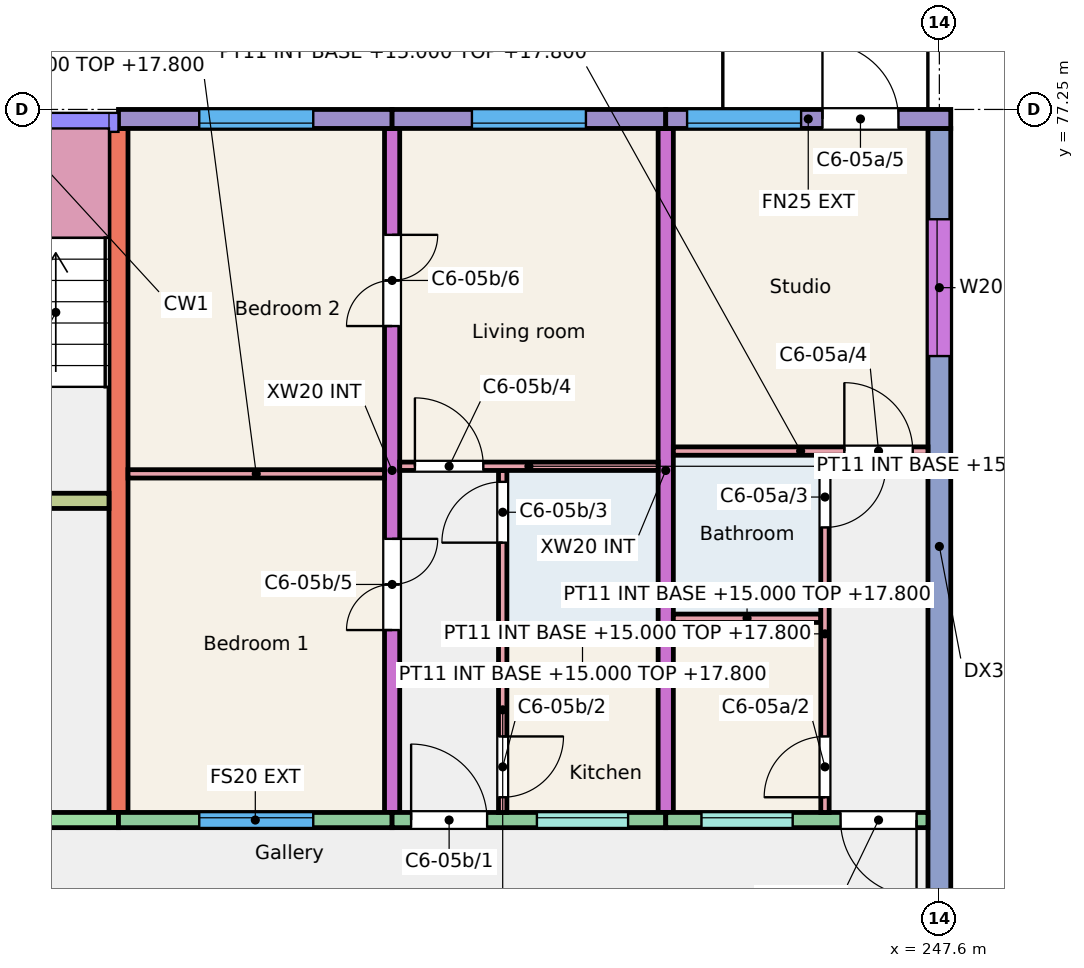
"""IFC4 building model, lengths in metres.
Left out: names, types, materials, properties, quantities, classifications, styles, units other than length and angle.
Written with IfcOpenShell. Run it as: python <this file> out.ifc"""

import sys

from ifc_helpers import new_model, si_unit, direction, frame, frame_2d, origin, place, context, subcontext, project, spatial, rectangle, extrude, element, fill, save


model = new_model("IFC4")
c1 = context("Model", 3, precision=1e-05, world=origin(), true_north=direction((0.0, 1.0)))
c2 = subcontext(c1, "Body", "Model", "MODEL_VIEW")
j1 = project(units=[si_unit("LENGTHUNIT", "METRE"), si_unit("PLANEANGLEUNIT", "RADIAN")], contexts=[c1])
p1 = place(None, origin())
s1 = spatial("IfcSite", under=j1, at=p1, CompositionType="ELEMENT")
p2 = place(p1, origin())
s2 = spatial("IfcBuilding", under=s1, at=p2, CompositionType="ELEMENT")
p3 = place(p2, frame((0.0, 0.0, 15.0)))
s3 = spatial("IfcBuildingStorey", under=s2, at=p3, CompositionType="ELEMENT", Elevation=15.0)
p4 = place(p3, frame((236.8, 68.0, 0.0), z_axis=(0.0, 0.0, 1.0), x_axis=(0.0, 1.0, 0.0)))
e1 = element("IfcWall", 1, at=p4, inside=s3, PredefinedType="SHEAR", context=c2, shape_type="SweptSolid", body=[
    extrude(rectangle(XDim=9.0, YDim=0.25, at=frame_2d((4.5, 0.0))), origin(), (0.0, 0.0, 1.0), 3.0),
])
p5 = place(p3, frame((240.4, 68.0, 0.0), z_axis=(0.0, 0.0, 1.0), x_axis=(0.0, 1.0, 0.0)))
e2 = element("IfcWall", 2, at=p5, inside=s3, PredefinedType="SHEAR", context=c2, shape_type="SweptSolid", body=[
    extrude(rectangle(XDim=9.0, YDim=0.2, at=frame_2d((4.5, 0.0))), origin(), (0.0, 0.0, 1.0), 3.0),
])
p6 = place(p5, frame((2.4, 0.0, 0.0)))
e3 = element("IfcOpeningElement", 3, at=p6, cuts=e2, PredefinedType="OPENING", context=c2, shape_type="SweptSolid", body=[
    extrude(rectangle(XDim=1.2, YDim=2.1, at=frame_2d((0.6, 1.05))), frame((0.0, 0.11, 0.0), z_axis=(0.0, -1.0, 0.0), x_axis=(1.0, 0.0, 0.0)), (0.0, 0.0, 1.0), 0.22),
])
p7 = place(p5, frame((6.4, 0.0, 0.0)))
e4 = element("IfcOpeningElement", 4, at=p7, cuts=e2, PredefinedType="OPENING", context=c2, shape_type="SweptSolid", body=[
    extrude(rectangle(XDim=1.2, YDim=2.1, at=frame_2d((0.6, 1.05))), frame((0.0, 0.11, 0.0), z_axis=(0.0, -1.0, 0.0), x_axis=(1.0, 0.0, 0.0)), (0.0, 0.0, 1.0), 0.22),
])
p8 = place(p3, frame((244.0, 68.0, 0.0), z_axis=(0.0, 0.0, 1.0), x_axis=(0.0, 1.0, 0.0)))
e5 = element("IfcWall", 5, at=p8, inside=s3, PredefinedType="SHEAR", context=c2, shape_type="SweptSolid", body=[
    extrude(rectangle(XDim=9.0, YDim=0.2, at=frame_2d((4.5, 0.0))), origin(), (0.0, 0.0, 1.0), 3.0),
])
p9 = place(p3, frame((247.6, 66.0, 0.0), z_axis=(0.0, 0.0, 1.0), x_axis=(0.0, 1.0, 0.0)))
e6 = element("IfcWall", 6, at=p9, inside=s3, PredefinedType="SHEAR", context=c2, shape_type="SweptSolid", body=[
    extrude(rectangle(XDim=11.0, YDim=0.3, at=frame_2d((5.5, 0.0))), origin(), (0.0, 0.0, 1.0), 3.0),
])
p10 = place(p9, frame((8.005, 0.0, 0.9)))
e7 = element("IfcOpeningElement", 7, at=p10, cuts=e6, PredefinedType="OPENING", context=c2, shape_type="SweptSolid", body=[
    extrude(rectangle(XDim=1.8, YDim=1.5, at=frame_2d((0.9, 0.75))), frame((0.0, 0.16, 0.0), z_axis=(0.0, -1.0, 0.0), x_axis=(1.0, 0.0, 0.0)), (0.0, 0.0, 1.0), 0.32),
])
p11 = place(p3, frame((230.95, 67.9, 0.0), z_axis=(0.0, 0.0, 1.0), x_axis=(1.0, 0.0, 0.0)))
e8 = element("IfcWall", 8, at=p11, inside=s3, PredefinedType="SHEAR", context=c2, shape_type="SweptSolid", body=[
    extrude(rectangle(XDim=5.85, YDim=0.2, at=frame_2d((2.925, 0.0))), origin(), (0.0, 0.0, 1.0), 3.0),
])
p12 = place(p11, frame((2.312, 0.0, 0.0)))
e9 = element("IfcOpeningElement", 9, at=p12, cuts=e8, PredefinedType="OPENING", context=c2, shape_type="SweptSolid", body=[
    extrude(rectangle(XDim=1.1, YDim=2.1, at=frame_2d((0.55, 1.05))), frame((0.0, 0.11, 0.0), z_axis=(0.0, -1.0, 0.0), x_axis=(1.0, 0.0, 0.0)), (0.0, 0.0, 1.0), 0.22),
])
p13 = place(p3, frame((230.95, 72.1, 0.0), z_axis=(0.0, 0.0, 1.0), x_axis=(1.0, 0.0, 0.0)))
e10 = element("IfcWall", 10, at=p13, inside=s3, PredefinedType="SHEAR", context=c2, shape_type="SweptSolid", body=[
    extrude(rectangle(XDim=5.725, YDim=0.2, at=frame_2d((2.863, 0.0))), origin(), (0.0, 0.0, 1.0), 3.0),
])
p14 = place(p13, frame((3.775, 0.0, 0.0)))
e11 = element("IfcOpeningElement", 11, at=p14, cuts=e10, PredefinedType="OPENING", context=c2, shape_type="SweptSolid", body=[
    extrude(rectangle(XDim=1.0, YDim=2.1, at=frame_2d((0.5, 1.05))), frame((0.0, 0.11, 0.0), z_axis=(0.0, -1.0, 0.0), x_axis=(1.0, 0.0, 0.0)), (0.0, 0.0, 1.0), 0.22),
])
p15 = place(p13, frame((0.762, 0.0, 0.0)))
e12 = element("IfcOpeningElement", 12, at=p15, cuts=e10, PredefinedType="OPENING", context=c2, shape_type="SweptSolid", body=[
    extrude(rectangle(XDim=1.1, YDim=2.1, at=frame_2d((0.55, 1.05))), frame((0.0, 0.11, 0.0), z_axis=(0.0, -1.0, 0.0), x_axis=(1.0, 0.0, 0.0)), (0.0, 0.0, 1.0), 0.22),
])
p16 = place(p3, frame((236.8, 77.125, 0.0), z_axis=(0.0, 0.0, 1.0), x_axis=(1.0, 0.0, 0.0)))
e13 = element("IfcWall", 13, at=p16, inside=s3, PredefinedType="SOLIDWALL", context=c2, shape_type="SweptSolid", body=[
    extrude(rectangle(XDim=3.6, YDim=0.25, at=frame_2d((1.8, 0.0))), origin(), (0.0, 0.0, 1.0), 3.0),
])
p17 = place(p16, frame((1.062, 0.0, 0.9)))
e14 = element("IfcOpeningElement", 14, at=p17, cuts=e13, PredefinedType="OPENING", context=c2, shape_type="SweptSolid", body=[
    extrude(rectangle(XDim=1.5, YDim=1.5, at=frame_2d((0.75, 0.75))), frame((0.0, 0.135, 0.0), z_axis=(0.0, -1.0, 0.0), x_axis=(1.0, 0.0, 0.0)), (0.0, 0.0, 1.0), 0.27),
])
p18 = place(p3, frame((236.8, 67.9, 0.0), z_axis=(0.0, 0.0, 1.0), x_axis=(1.0, 0.0, 0.0)))
e15 = element("IfcWall", 15, at=p18, inside=s3, PredefinedType="SOLIDWALL", context=c2, shape_type="SweptSolid", body=[
    extrude(rectangle(XDim=3.6, YDim=0.2, at=frame_2d((1.8, 0.0))), origin(), (0.0, 0.0, 1.0), 3.0),
])
p19 = place(p18, frame((1.062, 0.0, 0.9)))
e16 = element("IfcOpeningElement", 16, at=p19, cuts=e15, PredefinedType="OPENING", context=c2, shape_type="SweptSolid", body=[
    extrude(rectangle(XDim=1.5, YDim=1.5, at=frame_2d((0.75, 0.75))), frame((0.0, 0.11, 0.0), z_axis=(0.0, -1.0, 0.0), x_axis=(1.0, 0.0, 0.0)), (0.0, 0.0, 1.0), 0.22),
])
p20 = place(p3, frame((240.4, 77.125, 0.0), z_axis=(0.0, 0.0, 1.0), x_axis=(1.0, 0.0, 0.0)))
e17 = element("IfcWall", 17, at=p20, inside=s3, PredefinedType="SOLIDWALL", context=c2, shape_type="SweptSolid", body=[
    extrude(rectangle(XDim=3.6, YDim=0.25, at=frame_2d((1.8, 0.0))), origin(), (0.0, 0.0, 1.0), 3.0),
])
p21 = place(p20, frame((1.05, 0.0, 0.9)))
e18 = element("IfcOpeningElement", 18, at=p21, cuts=e17, PredefinedType="OPENING", context=c2, shape_type="SweptSolid", body=[
    extrude(rectangle(XDim=1.5, YDim=1.5, at=frame_2d((0.75, 0.75))), frame((0.0, 0.135, 0.0), z_axis=(0.0, -1.0, 0.0), x_axis=(1.0, 0.0, 0.0)), (0.0, 0.0, 1.0), 0.27),
])
p22 = place(p3, frame((240.4, 67.9, 0.0), z_axis=(0.0, 0.0, 1.0), x_axis=(1.0, 0.0, 0.0)))
e19 = element("IfcWall", 19, at=p22, inside=s3, PredefinedType="SOLIDWALL", context=c2, shape_type="SweptSolid", body=[
    extrude(rectangle(XDim=3.6, YDim=0.2, at=frame_2d((1.8, 0.0))), origin(), (0.0, 0.0, 1.0), 3.0),
])
p23 = place(p22, frame((1.905, 0.0, 1.1)))
e20 = element("IfcOpeningElement", 20, at=p23, cuts=e19, PredefinedType="OPENING", context=c2, shape_type="SweptSolid", body=[
    extrude(rectangle(XDim=1.2, YDim=1.3, at=frame_2d((0.6, 0.65))), frame((0.0, 0.11, 0.0), z_axis=(0.0, -1.0, 0.0), x_axis=(1.0, 0.0, 0.0)), (0.0, 0.0, 1.0), 0.22),
])
p24 = place(p22, frame((0.25, 0.0, 0.0)))
e21 = element("IfcOpeningElement", 21, at=p24, cuts=e19, PredefinedType="OPENING", context=c2, shape_type="SweptSolid", body=[
    extrude(rectangle(XDim=1.0, YDim=2.1, at=frame_2d((0.5, 1.05))), frame((0.0, 0.11, 0.0), z_axis=(0.0, -1.0, 0.0), x_axis=(1.0, 0.0, 0.0)), (0.0, 0.0, 1.0), 0.22),
])
p25 = place(p3, frame((244.0, 77.125, 0.0), z_axis=(0.0, 0.0, 1.0), x_axis=(1.0, 0.0, 0.0)))
e22 = element("IfcWall", 22, at=p25, inside=s3, PredefinedType="SOLIDWALL", context=c2, shape_type="SweptSolid", body=[
    extrude(rectangle(XDim=3.75, YDim=0.25, at=frame_2d((1.875, 0.0))), origin(), (0.0, 0.0, 1.0), 3.0),
])
p26 = place(p25, frame((0.281, 0.0, 0.9)))
e23 = element("IfcOpeningElement", 23, at=p26, cuts=e22, PredefinedType="OPENING", context=c2, shape_type="SweptSolid", body=[
    extrude(rectangle(XDim=1.5, YDim=1.5, at=frame_2d((0.75, 0.75))), frame((0.0, 0.135, 0.0), z_axis=(0.0, -1.0, 0.0), x_axis=(1.0, 0.0, 0.0)), (0.0, 0.0, 1.0), 0.27),
])
p27 = place(p25, frame((2.062, 0.0, 0.0)))
e24 = element("IfcOpeningElement", 24, at=p27, cuts=e22, PredefinedType="OPENING", context=c2, shape_type="SweptSolid", body=[
    extrude(rectangle(XDim=1.0, YDim=2.1, at=frame_2d((0.5, 1.05))), frame((0.0, 0.135, 0.0), z_axis=(0.0, -1.0, 0.0), x_axis=(1.0, 0.0, 0.0)), (0.0, 0.0, 1.0), 0.27),
])
p28 = place(p3, frame((244.0, 67.9, 0.0), z_axis=(0.0, 0.0, 1.0), x_axis=(1.0, 0.0, 0.0)))
e25 = element("IfcWall", 25, at=p28, inside=s3, PredefinedType="SOLIDWALL", context=c2, shape_type="SweptSolid", body=[
    extrude(rectangle(XDim=3.45, YDim=0.2, at=frame_2d((1.725, 0.0))), origin(), (0.0, 0.0, 1.0), 3.0),
])
p29 = place(p28, frame((0.47, 0.0, 1.1)))
e26 = element("IfcOpeningElement", 26, at=p29, cuts=e25, PredefinedType="OPENING", context=c2, shape_type="SweptSolid", body=[
    extrude(rectangle(XDim=1.2, YDim=1.3, at=frame_2d((0.6, 0.65))), frame((0.0, 0.11, 0.0), z_axis=(0.0, -1.0, 0.0), x_axis=(1.0, 0.0, 0.0)), (0.0, 0.0, 1.0), 0.22),
])
p30 = place(p28, frame((2.3, 0.0, 0.0)))
e27 = element("IfcOpeningElement", 27, at=p30, cuts=e25, PredefinedType="OPENING", context=c2, shape_type="SweptSolid", body=[
    extrude(rectangle(XDim=1.0, YDim=2.1, at=frame_2d((0.5, 1.05))), frame((0.0, 0.11, 0.0), z_axis=(0.0, -1.0, 0.0), x_axis=(1.0, 0.0, 0.0)), (0.0, 0.0, 1.0), 0.22),
])
p31 = place(p3, frame((244.1, 70.555, 0.0), z_axis=(0.0, 0.0, 1.0), x_axis=(1.0, 0.0, 0.0)))
e28 = element("IfcWall", 28, at=p31, inside=s3, PredefinedType="PARTITIONING", context=c2, shape_type="SweptSolid", body=[
    extrude(rectangle(XDim=1.94, YDim=0.11, at=frame_2d((0.97, 0.0))), origin(), (0.0, 0.0, 1.0), 2.8),
])
p32 = place(p3, frame((246.095, 68.0, 0.0), z_axis=(0.0, 0.0, 1.0), x_axis=(0.0, 1.0, 0.0)))
e29 = element("IfcWall", 29, at=p32, inside=s3, PredefinedType="PARTITIONING", context=c2, shape_type="SweptSolid", body=[
    extrude(rectangle(XDim=4.7, YDim=0.11, at=frame_2d((2.35, 0.0))), origin(), (0.0, 0.0, 1.0), 2.8),
])
p33 = place(p32, frame((0.2, 0.0, 0.0)))
e30 = element("IfcOpeningElement", 30, at=p33, cuts=e29, PredefinedType="OPENING", context=c2, shape_type="SweptSolid", body=[
    extrude(rectangle(XDim=0.8, YDim=2.1, at=frame_2d((0.4, 1.05))), frame((0.0, 0.065, 0.0), z_axis=(0.0, -1.0, 0.0), x_axis=(1.0, 0.0, 0.0)), (0.0, 0.0, 1.0), 0.13),
])
p34 = place(p32, frame((3.75, 0.0, 0.0)))
e31 = element("IfcOpeningElement", 31, at=p34, cuts=e29, PredefinedType="OPENING", context=c2, shape_type="SweptSolid", body=[
    extrude(rectangle(XDim=0.8, YDim=2.1, at=frame_2d((0.4, 1.05))), frame((0.0, 0.065, 0.0), z_axis=(0.0, -1.0, 0.0), x_axis=(1.0, 0.0, 0.0)), (0.0, 0.0, 1.0), 0.13),
])
p35 = place(p3, frame((244.1, 72.755, 0.0), z_axis=(0.0, 0.0, 1.0), x_axis=(1.0, 0.0, 0.0)))
e32 = element("IfcWall", 32, at=p35, inside=s3, PredefinedType="PARTITIONING", context=c2, shape_type="SweptSolid", body=[
    extrude(rectangle(XDim=3.35, YDim=0.11, at=frame_2d((1.675, 0.0))), origin(), (0.0, 0.0, 1.0), 2.8),
])
p36 = place(p35, frame((2.25, 0.0, 0.0)))
e33 = element("IfcOpeningElement", 33, at=p36, cuts=e32, PredefinedType="OPENING", context=c2, shape_type="SweptSolid", body=[
    extrude(rectangle(XDim=0.9, YDim=2.1, at=frame_2d((0.45, 1.05))), frame((0.0, 0.065, 0.0), z_axis=(0.0, -1.0, 0.0), x_axis=(1.0, 0.0, 0.0)), (0.0, 0.0, 1.0), 0.13),
])
p37 = place(p3, frame((241.855, 68.0, 0.0), z_axis=(0.0, 0.0, 1.0), x_axis=(0.0, 1.0, 0.0)))
e34 = element("IfcWall", 34, at=p37, inside=s3, PredefinedType="PARTITIONING", context=c2, shape_type="SweptSolid", body=[
    extrude(rectangle(XDim=4.5, YDim=0.11, at=frame_2d((2.25, 0.0))), origin(), (0.0, 0.0, 1.0), 2.8),
])
p38 = place(p37, frame((0.2, 0.0, 0.0)))
e35 = element("IfcOpeningElement", 35, at=p38, cuts=e34, PredefinedType="OPENING", context=c2, shape_type="SweptSolid", body=[
    extrude(rectangle(XDim=0.8, YDim=2.1, at=frame_2d((0.4, 1.05))), frame((0.0, 0.065, 0.0), z_axis=(0.0, -1.0, 0.0), x_axis=(1.0, 0.0, 0.0)), (0.0, 0.0, 1.0), 0.13),
])
p39 = place(p37, frame((3.55, 0.0, 0.0)))
e36 = element("IfcOpeningElement", 36, at=p39, cuts=e34, PredefinedType="OPENING", context=c2, shape_type="SweptSolid", body=[
    extrude(rectangle(XDim=0.8, YDim=2.1, at=frame_2d((0.4, 1.05))), frame((0.0, 0.065, 0.0), z_axis=(0.0, -1.0, 0.0), x_axis=(1.0, 0.0, 0.0)), (0.0, 0.0, 1.0), 0.13),
])
p40 = place(p3, frame((241.91, 70.355, 0.0), z_axis=(0.0, 0.0, 1.0), x_axis=(1.0, 0.0, 0.0)))
e37 = element("IfcWall", 37, at=p40, inside=s3, PredefinedType="PARTITIONING", context=c2, shape_type="SweptSolid", body=[
    extrude(rectangle(XDim=1.99, YDim=0.11, at=frame_2d((0.995, 0.0))), origin(), (0.0, 0.0, 1.0), 2.8),
])
p41 = place(p3, frame((240.5, 72.555, 0.0), z_axis=(0.0, 0.0, 1.0), x_axis=(1.0, 0.0, 0.0)))
e38 = element("IfcWall", 38, at=p41, inside=s3, PredefinedType="PARTITIONING", context=c2, shape_type="SweptSolid", body=[
    extrude(rectangle(XDim=3.4, YDim=0.11, at=frame_2d((1.7, 0.0))), origin(), (0.0, 0.0, 1.0), 2.8),
])
p42 = place(p41, frame((0.2, 0.0, 0.0)))
e39 = element("IfcOpeningElement", 39, at=p42, cuts=e38, PredefinedType="OPENING", context=c2, shape_type="SweptSolid", body=[
    extrude(rectangle(XDim=0.9, YDim=2.1, at=frame_2d((0.45, 1.05))), frame((0.0, 0.065, 0.0), z_axis=(0.0, -1.0, 0.0), x_axis=(1.0, 0.0, 0.0)), (0.0, 0.0, 1.0), 0.13),
])
p43 = place(p3, frame((236.925, 72.455, 0.0), z_axis=(0.0, 0.0, 1.0), x_axis=(1.0, 0.0, 0.0)))
e40 = element("IfcWall", 40, at=p43, inside=s3, PredefinedType="PARTITIONING", context=c2, shape_type="SweptSolid", body=[
    extrude(rectangle(XDim=3.375, YDim=0.11, at=frame_2d((1.688, 0.0))), origin(), (0.0, 0.0, 1.0), 2.8),
])
p44 = place(p29, origin())
e41 = element("IfcWindow", 41, at=p44, inside=s3, PartitioningType="SINGLE_PANEL", PredefinedType="WINDOW", context=c2, shape_type="SweptSolid", body=[
    extrude(rectangle(XDim=1.2, YDim=1.3, at=frame_2d((0.6, 0.65))), frame((0.0, 0.06, 0.0), z_axis=(0.0, -1.0, 0.0), x_axis=(1.0, 0.0, 0.0)), (0.0, 0.0, 1.0), 0.06),
])
fill(e26, e41)
p45 = place(p26, origin())
e42 = element("IfcWindow", 42, at=p45, inside=s3, PartitioningType="SINGLE_PANEL", PredefinedType="WINDOW", context=c2, shape_type="SweptSolid", body=[
    extrude(rectangle(XDim=1.5, YDim=1.5, at=frame_2d((0.75, 0.75))), frame((0.0, -0.025, 0.0), z_axis=(0.0, -1.0, 0.0), x_axis=(1.0, 0.0, 0.0)), (0.0, 0.0, 1.0), 0.06),
])
fill(e23, e42)
p46 = place(p10, origin())
e43 = element("IfcWindow", 43, at=p46, inside=s3, PartitioningType="SINGLE_PANEL", PredefinedType="WINDOW", context=c2, shape_type="SweptSolid", body=[
    extrude(rectangle(XDim=1.8, YDim=1.5, at=frame_2d((0.9, 0.75))), frame((0.0, 0.06, 0.0), z_axis=(0.0, -1.0, 0.0), x_axis=(1.0, 0.0, 0.0)), (0.0, 0.0, 1.0), 0.06),
])
fill(e7, e43)
p47 = place(p19, origin())
e44 = element("IfcWindow", 44, at=p47, inside=s3, PartitioningType="SINGLE_PANEL", PredefinedType="WINDOW", context=c2, shape_type="SweptSolid", body=[
    extrude(rectangle(XDim=1.5, YDim=1.5, at=frame_2d((0.75, 0.75))), frame((0.0, 0.06, 0.0), z_axis=(0.0, -1.0, 0.0), x_axis=(1.0, 0.0, 0.0)), (0.0, 0.0, 1.0), 0.06),
])
fill(e16, e44)
p48 = place(p17, origin())
e45 = element("IfcWindow", 45, at=p48, inside=s3, PartitioningType="SINGLE_PANEL", PredefinedType="WINDOW", context=c2, shape_type="SweptSolid", body=[
    extrude(rectangle(XDim=1.5, YDim=1.5, at=frame_2d((0.75, 0.75))), frame((0.0, -0.025, 0.0), z_axis=(0.0, -1.0, 0.0), x_axis=(1.0, 0.0, 0.0)), (0.0, 0.0, 1.0), 0.06),
])
fill(e14, e45)
p49 = place(p23, origin())
e46 = element("IfcWindow", 46, at=p49, inside=s3, PartitioningType="SINGLE_PANEL", PredefinedType="WINDOW", context=c2, shape_type="SweptSolid", body=[
    extrude(rectangle(XDim=1.2, YDim=1.3, at=frame_2d((0.6, 0.65))), frame((0.0, 0.06, 0.0), z_axis=(0.0, -1.0, 0.0), x_axis=(1.0, 0.0, 0.0)), (0.0, 0.0, 1.0), 0.06),
])
fill(e20, e46)
p50 = place(p21, origin())
e47 = element("IfcWindow", 47, at=p50, inside=s3, PartitioningType="SINGLE_PANEL", PredefinedType="WINDOW", context=c2, shape_type="SweptSolid", body=[
    extrude(rectangle(XDim=1.5, YDim=1.5, at=frame_2d((0.75, 0.75))), frame((0.0, -0.025, 0.0), z_axis=(0.0, -1.0, 0.0), x_axis=(1.0, 0.0, 0.0)), (0.0, 0.0, 1.0), 0.06),
])
fill(e18, e47)
p51 = place(p30, origin())
e48 = element("IfcDoor", 48, at=p51, inside=s3, OperationType="SINGLE_SWING_RIGHT", PredefinedType="DOOR", context=c2, shape_type="SweptSolid", body=[
    extrude(rectangle(XDim=1.0, YDim=2.1, at=frame_2d((0.5, 1.05))), frame((0.0, 0.025, 0.0), z_axis=(0.0, -1.0, 0.0), x_axis=(1.0, 0.0, 0.0)), (0.0, 0.0, 1.0), 0.05),
])
fill(e27, e48)
p52 = place(p33, origin())
e49 = element("IfcDoor", 49, at=p52, inside=s3, OperationType="SINGLE_SWING_LEFT", PredefinedType="DOOR", context=c2, shape_type="SweptSolid", body=[
    extrude(rectangle(XDim=0.8, YDim=2.1, at=frame_2d((0.4, 1.05))), frame((0.0, 0.025, 0.0), z_axis=(0.0, -1.0, 0.0), x_axis=(1.0, 0.0, 0.0)), (0.0, 0.0, 1.0), 0.05),
])
fill(e30, e49)
p53 = place(p34, origin())
e50 = element("IfcDoor", 50, at=p53, inside=s3, OperationType="SINGLE_SWING_RIGHT", PredefinedType="DOOR", context=c2, shape_type="SweptSolid", body=[
    extrude(rectangle(XDim=0.8, YDim=2.1, at=frame_2d((0.4, 1.05))), frame((0.0, 0.025, 0.0), z_axis=(0.0, -1.0, 0.0), x_axis=(1.0, 0.0, 0.0)), (0.0, 0.0, 1.0), 0.05),
])
fill(e31, e50)
p54 = place(p36, origin())
e51 = element("IfcDoor", 51, at=p54, inside=s3, OperationType="SINGLE_SWING_LEFT", PredefinedType="DOOR", context=c2, shape_type="SweptSolid", body=[
    extrude(rectangle(XDim=0.9, YDim=2.1, at=frame_2d((0.45, 1.05))), frame((0.0, 0.025, 0.0), z_axis=(0.0, -1.0, 0.0), x_axis=(1.0, 0.0, 0.0)), (0.0, 0.0, 1.0), 0.05),
])
fill(e33, e51)
p55 = place(p27, origin())
e52 = element("IfcDoor", 52, at=p55, inside=s3, OperationType="SINGLE_SWING_LEFT", PredefinedType="DOOR", context=c2, shape_type="SweptSolid", body=[
    extrude(rectangle(XDim=1.0, YDim=2.1, at=frame_2d((0.5, 1.05))), frame((0.0, 0.025, 0.0), z_axis=(0.0, -1.0, 0.0), x_axis=(1.0, 0.0, 0.0)), (0.0, 0.0, 1.0), 0.05),
])
fill(e24, e52)
p56 = place(p24, origin())
e53 = element("IfcDoor", 53, at=p56, inside=s3, OperationType="SINGLE_SWING_LEFT", PredefinedType="DOOR", context=c2, shape_type="SweptSolid", body=[
    extrude(rectangle(XDim=1.0, YDim=2.1, at=frame_2d((0.5, 1.05))), frame((0.0, 0.025, 0.0), z_axis=(0.0, -1.0, 0.0), x_axis=(1.0, 0.0, 0.0)), (0.0, 0.0, 1.0), 0.05),
])
fill(e21, e53)
p57 = place(p38, origin())
e54 = element("IfcDoor", 54, at=p57, inside=s3, OperationType="SINGLE_SWING_RIGHT", PredefinedType="DOOR", context=c2, shape_type="SweptSolid", body=[
    extrude(rectangle(XDim=0.8, YDim=2.1, at=frame_2d((0.4, 1.05))), frame((0.0, 0.025, 0.0), z_axis=(0.0, -1.0, 0.0), x_axis=(1.0, 0.0, 0.0)), (0.0, 0.0, 1.0), 0.05),
])
fill(e35, e54)
p58 = place(p39, origin())
e55 = element("IfcDoor", 55, at=p58, inside=s3, OperationType="SINGLE_SWING_LEFT", PredefinedType="DOOR", context=c2, shape_type="SweptSolid", body=[
    extrude(rectangle(XDim=0.8, YDim=2.1, at=frame_2d((0.4, 1.05))), frame((0.0, 0.025, 0.0), z_axis=(0.0, -1.0, 0.0), x_axis=(1.0, 0.0, 0.0)), (0.0, 0.0, 1.0), 0.05),
])
fill(e36, e55)
p59 = place(p42, origin())
e56 = element("IfcDoor", 56, at=p59, inside=s3, OperationType="SINGLE_SWING_LEFT", PredefinedType="DOOR", context=c2, shape_type="SweptSolid", body=[
    extrude(rectangle(XDim=0.9, YDim=2.1, at=frame_2d((0.45, 1.05))), frame((0.0, 0.025, 0.0), z_axis=(0.0, -1.0, 0.0), x_axis=(1.0, 0.0, 0.0)), (0.0, 0.0, 1.0), 0.05),
])
fill(e39, e56)
p60 = place(p6, origin())
e57 = element("IfcDoor", 57, at=p60, inside=s3, OperationType="DOUBLE_DOOR_SINGLE_SWING", PredefinedType="DOOR", context=c2, shape_type="SweptSolid", body=[
    extrude(rectangle(XDim=1.2, YDim=2.1, at=frame_2d((0.6, 1.05))), frame((0.0, 0.025, 0.0), z_axis=(0.0, -1.0, 0.0), x_axis=(1.0, 0.0, 0.0)), (0.0, 0.0, 1.0), 0.05),
])
fill(e3, e57)
p61 = place(p7, origin())
e58 = element("IfcDoor", 58, at=p61, inside=s3, OperationType="DOUBLE_DOOR_SINGLE_SWING", PredefinedType="DOOR", context=c2, shape_type="SweptSolid", body=[
    extrude(rectangle(XDim=1.2, YDim=2.1, at=frame_2d((0.6, 1.05))), frame((0.0, 0.025, 0.0), z_axis=(0.0, -1.0, 0.0), x_axis=(1.0, 0.0, 0.0)), (0.0, 0.0, 1.0), 0.05),
])
fill(e4, e58)
save(model, sys.argv[1])
